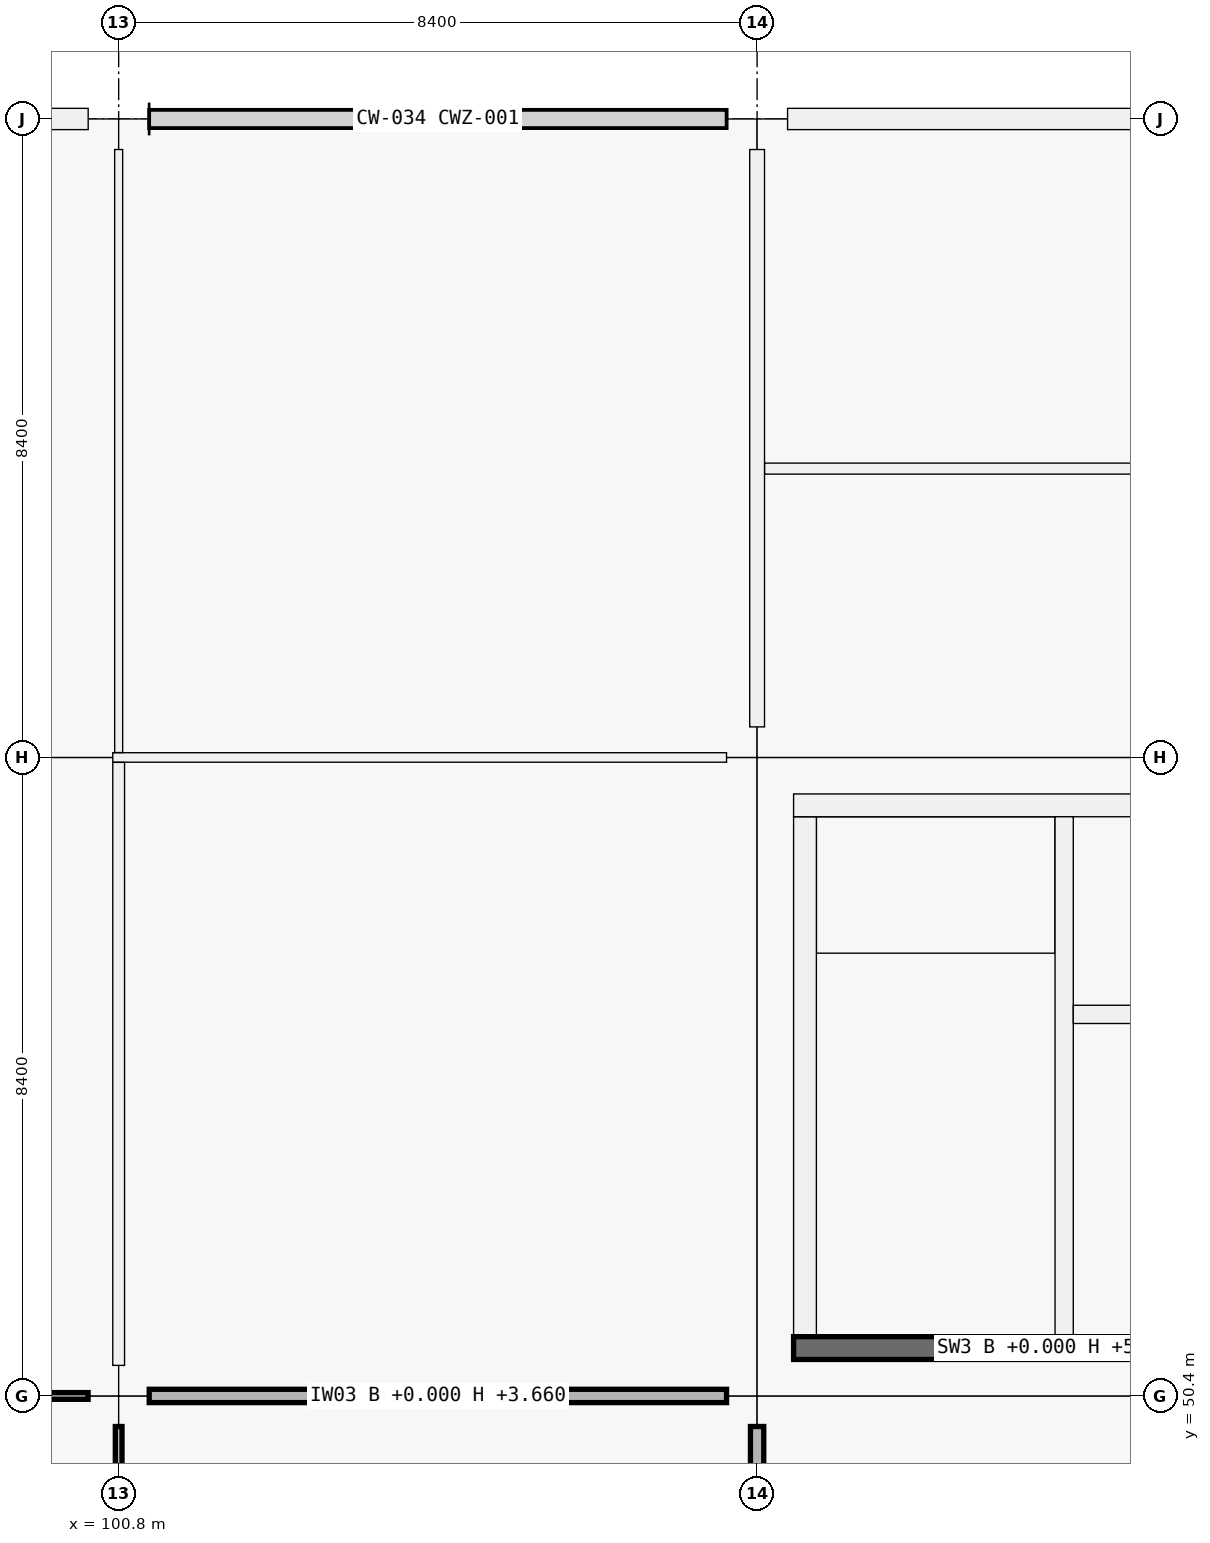
"""IFC4 building model, lengths in metres.
Left out: names, types, materials, properties, quantities, classifications, styles, units other than length and angle.
Written with IfcOpenShell. Run it as: python <this file> out.ifc"""

import sys

from ifc_helpers import new_model, si_unit, direction, frame, frame_2d, origin, origin_2d, place, context, subcontext, project, spatial, rectangle, extrude, element, fill, save


model = new_model("IFC4")
c1 = context("Model", 3, precision=1e-05, world=origin(), true_north=direction((0.0, 1.0)))
c2 = subcontext(c1, "Body", "Model", "MODEL_VIEW")
j1 = project(units=[si_unit("LENGTHUNIT", "METRE"), si_unit("PLANEANGLEUNIT", "RADIAN")], contexts=[c1])
p1 = place(None, origin())
s1 = spatial("IfcSite", under=j1, at=p1, CompositionType="ELEMENT")
p2 = place(p1, origin())
s2 = spatial("IfcBuilding", under=s1, at=p2, CompositionType="ELEMENT")
p3 = place(p2, origin())
s3 = spatial("IfcBuildingStorey", under=s2, at=p3, CompositionType="ELEMENT", Elevation=0.0)
for number, where, z_axis, x_axis in (
    (1, (100.8, 50.4, 0.0), (0.0, 0.0, 1.0), (1.0, 0.0, 0.0)),
    (2, (100.8, 67.2, 0.0), (0.0, 0.0, 1.0), (1.0, 0.0, 0.0)),
    (3, (109.2, 50.4, 0.0), (0.0, 0.0, 1.0), (1.0, 0.0, 0.0)),
    (4, (109.2, 58.8, 0.0), (0.0, 0.0, 1.0), (1.0, 0.0, 0.0)),
    (5, (109.2, 67.2, 0.0), (0.0, 0.0, 1.0), (1.0, 0.0, 0.0)),
):
    element("IfcColumn", number, at=place(p3, frame(where, z_axis=z_axis, x_axis=x_axis)), inside=s3, PredefinedType="COLUMN", context=c2, shape_type="SweptSolid", body=[
        extrude(rectangle(XDim=0.8, YDim=0.8, at=origin_2d()), origin(), (0.0, 0.0, 1.0), 5.76),
    ])
p4 = place(p3, frame((92.801, 67.2, 0.0), z_axis=(0.0, 0.0, 1.0), x_axis=(1.0, 0.0, 0.0)))
e6 = element("IfcWall", 6, at=p4, inside=s3, PredefinedType="SOLIDWALL", context=c2, shape_type="SweptSolid", body=[
    extrude(rectangle(XDim=7.598, YDim=0.28, at=frame_2d((3.799, 0.0))), origin(), (0.0, 0.0, 1.0), 4.7),
])
p5 = place(p4, frame((2.649, 0.0, 0.9)))
e7 = element("IfcOpeningElement", 7, at=p5, cuts=e6, PredefinedType="OPENING", context=c2, shape_type="SweptSolid", body=[
    extrude(rectangle(XDim=2.3, YDim=1.85, at=frame_2d((1.15, 0.925))), frame((0.0, 0.14, 0.0), z_axis=(0.0, -1.0, 0.0), x_axis=(1.0, 0.0, 0.0)), (0.0, 0.0, 1.0), 0.28),
])
p6 = place(p3, frame((109.601, 67.2, 0.0), z_axis=(0.0, 0.0, 1.0), x_axis=(1.0, 0.0, 0.0)))
e8 = element("IfcWall", 8, at=p6, inside=s3, PredefinedType="SOLIDWALL", context=c2, shape_type="SweptSolid", body=[
    extrude(rectangle(XDim=7.623, YDim=0.28, at=frame_2d((3.812, 0.0))), origin(), (0.0, 0.0, 1.0), 4.7),
])
p7 = place(p6, frame((3.087, 0.0, 0.9)))
e9 = element("IfcOpeningElement", 9, at=p7, cuts=e8, PredefinedType="OPENING", context=c2, shape_type="SweptSolid", body=[
    extrude(rectangle(XDim=1.45, YDim=1.85, at=frame_2d((0.725, 0.925))), frame((0.0, 0.14, 0.0), z_axis=(0.0, -1.0, 0.0), x_axis=(1.0, 0.0, 0.0)), (0.0, 0.0, 1.0), 0.28),
])
p8 = place(p3, frame((117.12, 51.03, 0.0), z_axis=(0.0, 0.0, 1.0), x_axis=(-1.0, 0.0, 0.0)))
e10 = element("IfcWall", 10, at=p8, inside=s3, PredefinedType="SHEAR", context=c2, shape_type="SweptSolid", body=[
    extrude(rectangle(XDim=7.44, YDim=0.3, at=frame_2d((3.72, 0.0))), origin(), (0.0, 0.0, 1.0), 5.76),
])
p9 = place(p8, frame((1.28, 0.0, 0.0)))
e11 = element("IfcOpeningElement", 11, at=p9, cuts=e10, PredefinedType="OPENING", context=c2, shape_type="SweptSolid", body=[
    extrude(rectangle(XDim=1.5, YDim=2.15, at=frame_2d((0.75, 1.075))), frame((0.0, 0.15, 0.0), z_axis=(0.0, -1.0, 0.0), x_axis=(1.0, 0.0, 0.0)), (0.0, 0.0, 1.0), 0.3),
])
p10 = place(p3, frame((109.83, 51.18, 0.0), z_axis=(0.0, 0.0, 1.0), x_axis=(0.0, 1.0, 0.0)))
e12 = element("IfcWall", 12, at=p10, inside=s3, PredefinedType="SHEAR", context=c2, shape_type="SweptSolid", body=[
    extrude(rectangle(XDim=6.84, YDim=0.3, at=frame_2d((3.42, 0.0))), origin(), (0.0, 0.0, 1.0), 5.76),
])
p11 = place(p3, frame((109.68, 58.17, 0.0), z_axis=(0.0, 0.0, 1.0), x_axis=(1.0, 0.0, 0.0)))
e13 = element("IfcWall", 13, at=p11, inside=s3, PredefinedType="SHEAR", context=c2, shape_type="SweptSolid", body=[
    extrude(rectangle(XDim=7.44, YDim=0.3, at=frame_2d((3.72, 0.0))), origin(), (0.0, 0.0, 1.0), 5.76),
])
p12 = place(p3, frame((113.24, 51.18, 0.0), z_axis=(0.0, 0.0, 1.0), x_axis=(0.0, 1.0, 0.0)))
e14 = element("IfcWall", 14, at=p12, inside=s3, PredefinedType="SHEAR", context=c2, shape_type="SweptSolid", body=[
    extrude(rectangle(XDim=6.84, YDim=0.24, at=frame_2d((3.42, 0.0))), origin(), (0.0, 0.0, 1.0), 5.76),
])
p13 = place(p12, frame((0.12, 0.0, 0.0)))
e15 = element("IfcOpeningElement", 15, at=p13, cuts=e14, PredefinedType="OPENING", context=c2, shape_type="SweptSolid", body=[
    extrude(rectangle(XDim=1.0, YDim=2.15, at=frame_2d((0.5, 1.075))), frame((0.0, 0.12, 0.0), z_axis=(0.0, -1.0, 0.0), x_axis=(1.0, 0.0, 0.0)), (0.0, 0.0, 1.0), 0.24),
])
p14 = place(p3, frame((113.36, 55.42, 0.0), z_axis=(0.0, 0.0, 1.0), x_axis=(1.0, 0.0, 0.0)))
e16 = element("IfcWall", 16, at=p14, inside=s3, PredefinedType="SHEAR", context=c2, shape_type="SweptSolid", body=[
    extrude(rectangle(XDim=3.46, YDim=0.24, at=frame_2d((1.73, 0.0))), origin(), (0.0, 0.0, 1.0), 5.76),
])
p15 = place(p14, frame((1.18, 0.0, 0.0)))
e17 = element("IfcOpeningElement", 17, at=p15, cuts=e16, PredefinedType="OPENING", context=c2, shape_type="SweptSolid", body=[
    extrude(rectangle(XDim=1.1, YDim=2.15, at=frame_2d((0.55, 1.075))), frame((0.0, 0.12, 0.0), z_axis=(0.0, -1.0, 0.0), x_axis=(1.0, 0.0, 0.0)), (0.0, 0.0, 1.0), 0.24),
])
p16 = place(p3, frame((92.802, 50.4, 0.0), z_axis=(0.0, 0.0, 1.0), x_axis=(1.0, 0.0, 0.0)))
e18 = element("IfcWall", 18, at=p16, inside=s3, PredefinedType="PARTITIONING", context=c2, shape_type="SweptSolid", body=[
    extrude(rectangle(XDim=7.596, YDim=0.088, at=frame_2d((3.798, 0.0))), origin(), (0.0, 0.0, 1.0), 3.66),
])
p17 = place(p16, frame((3.123, 0.0, 0.0)))
e19 = element("IfcOpeningElement", 19, at=p17, cuts=e18, PredefinedType="OPENING", context=c2, shape_type="SweptSolid", body=[
    extrude(rectangle(XDim=1.35, YDim=2.2, at=frame_2d((0.675, 1.1))), frame((0.0, 0.044, 0.0), z_axis=(0.0, -1.0, 0.0), x_axis=(1.0, 0.0, 0.0)), (0.0, 0.0, 1.0), 0.088),
])
p18 = place(p3, frame((101.202, 50.4, 0.0), z_axis=(0.0, 0.0, 1.0), x_axis=(1.0, 0.0, 0.0)))
e20 = element("IfcWall", 20, at=p18, inside=s3, PredefinedType="PARTITIONING", context=c2, shape_type="SweptSolid", body=[
    extrude(rectangle(XDim=7.596, YDim=0.175, at=frame_2d((3.798, 0.0))), origin(), (0.0, 0.0, 1.0), 3.66),
])
p19 = place(p18, frame((2.948, 0.0, 0.0)))
e21 = element("IfcOpeningElement", 21, at=p19, cuts=e20, PredefinedType="OPENING", context=c2, shape_type="SweptSolid", body=[
    extrude(rectangle(XDim=1.7, YDim=2.35, at=frame_2d((0.85, 1.175))), frame((0.0, 0.087, 0.0), z_axis=(0.0, -1.0, 0.0), x_axis=(1.0, 0.0, 0.0)), (0.0, 0.0, 1.0), 0.175),
])
p20 = place(p3, frame((100.722, 58.8, 0.0), z_axis=(0.0, 0.0, 1.0), x_axis=(1.0, 0.0, 0.0)))
e22 = element("IfcWall", 22, at=p20, inside=s3, PredefinedType="PARTITIONING", context=c2, shape_type="SweptSolid", body=[
    extrude(rectangle(XDim=8.076, YDim=0.125, at=frame_2d((4.038, 0.0))), origin(), (0.0, 0.0, 1.0), 3.66),
])
p21 = place(p20, frame((3.238, 0.0, 0.0)))
e23 = element("IfcOpeningElement", 23, at=p21, cuts=e22, PredefinedType="OPENING", context=c2, shape_type="SweptSolid", body=[
    extrude(rectangle(XDim=1.6, YDim=2.3, at=frame_2d((0.8, 1.15))), frame((0.0, 0.062, 0.0), z_axis=(0.0, -1.0, 0.0), x_axis=(1.0, 0.0, 0.0)), (0.0, 0.0, 1.0), 0.125),
])
p22 = place(p3, frame((100.8, 42.402, 0.0), z_axis=(0.0, 0.0, 1.0), x_axis=(0.0, 1.0, 0.0)))
e24 = element("IfcWall", 24, at=p22, inside=s3, PredefinedType="PARTITIONING", context=c2, shape_type="SweptSolid", body=[
    extrude(rectangle(XDim=7.596, YDim=0.088, at=frame_2d((3.798, 0.0))), origin(), (0.0, 0.0, 1.0), 3.66),
])
p23 = place(p22, frame((3.338, 0.0, 0.0)))
e25 = element("IfcOpeningElement", 25, at=p23, cuts=e24, PredefinedType="OPENING", context=c2, shape_type="SweptSolid", body=[
    extrude(rectangle(XDim=0.92, YDim=2.15, at=frame_2d((0.46, 1.075))), frame((0.0, 0.044, 0.0), z_axis=(0.0, -1.0, 0.0), x_axis=(1.0, 0.0, 0.0)), (0.0, 0.0, 1.0), 0.088),
])
p24 = place(p3, frame((100.8, 50.802, 0.0), z_axis=(0.0, 0.0, 1.0), x_axis=(0.0, 1.0, 0.0)))
e26 = element("IfcWall", 26, at=p24, inside=s3, PredefinedType="PARTITIONING", context=c2, shape_type="SweptSolid", body=[
    extrude(rectangle(XDim=7.934, YDim=0.155, at=frame_2d((3.967, 0.0))), origin(), (0.0, 0.0, 1.0), 3.66),
])
p25 = place(p24, frame((3.267, 0.0, 0.0)))
e27 = element("IfcOpeningElement", 27, at=p25, cuts=e26, PredefinedType="OPENING", context=c2, shape_type="SweptSolid", body=[
    extrude(rectangle(XDim=1.4, YDim=2.25, at=frame_2d((0.7, 1.125))), frame((0.0, 0.078, 0.0), z_axis=(0.0, -1.0, 0.0), x_axis=(1.0, 0.0, 0.0)), (0.0, 0.0, 1.0), 0.155),
])
p26 = place(p3, frame((100.8, 58.865, 0.0), z_axis=(0.0, 0.0, 1.0), x_axis=(0.0, 1.0, 0.0)))
e28 = element("IfcWall", 28, at=p26, inside=s3, PredefinedType="PARTITIONING", context=c2, shape_type="SweptSolid", body=[
    extrude(rectangle(XDim=7.934, YDim=0.105, at=frame_2d((3.967, 0.0))), origin(), (0.0, 0.0, 1.0), 3.66),
])
p27 = place(p26, frame((3.292, 0.0, 0.0)))
e29 = element("IfcOpeningElement", 29, at=p27, cuts=e28, PredefinedType="OPENING", context=c2, shape_type="SweptSolid", body=[
    extrude(rectangle(XDim=1.35, YDim=2.2, at=frame_2d((0.675, 1.1))), frame((0.0, 0.052, 0.0), z_axis=(0.0, -1.0, 0.0), x_axis=(1.0, 0.0, 0.0)), (0.0, 0.0, 1.0), 0.105),
])
p28 = place(p3, frame((109.2, 42.402, 0.0), z_axis=(0.0, 0.0, 1.0), x_axis=(0.0, 1.0, 0.0)))
e30 = element("IfcWall", 30, at=p28, inside=s3, PredefinedType="PARTITIONING", context=c2, shape_type="SweptSolid", body=[
    extrude(rectangle(XDim=7.596, YDim=0.175, at=frame_2d((3.798, 0.0))), origin(), (0.0, 0.0, 1.0), 3.66),
])
p29 = place(p28, frame((2.898, 0.0, 0.0)))
e31 = element("IfcOpeningElement", 31, at=p29, cuts=e30, PredefinedType="OPENING", context=c2, shape_type="SweptSolid", body=[
    extrude(rectangle(XDim=1.8, YDim=2.4, at=frame_2d((0.9, 1.2))), frame((0.0, 0.087, 0.0), z_axis=(0.0, -1.0, 0.0), x_axis=(1.0, 0.0, 0.0)), (0.0, 0.0, 1.0), 0.175),
])
p30 = place(p3, frame((109.2, 59.202, 0.0), z_axis=(0.0, 0.0, 1.0), x_axis=(0.0, 1.0, 0.0)))
e32 = element("IfcWall", 32, at=p30, inside=s3, PredefinedType="PARTITIONING", context=c2, shape_type="SweptSolid", body=[
    extrude(rectangle(XDim=7.596, YDim=0.195, at=frame_2d((3.798, 0.0))), origin(), (0.0, 0.0, 1.0), 3.66),
])
p31 = place(p3, frame((109.3, 62.6, 0.0), z_axis=(0.0, 0.0, 1.0), x_axis=(1.0, 0.0, 0.0)))
e33 = element("IfcWall", 33, at=p31, inside=s3, PredefinedType="PARTITIONING", context=c2, shape_type="SweptSolid", body=[
    extrude(rectangle(XDim=8.216, YDim=0.145, at=frame_2d((4.108, 0.0))), origin(), (0.0, 0.0, 1.0), 3.66),
])
p32 = place(p7, origin())
e34 = element("IfcWindow", 34, at=p32, inside=s3, PartitioningType="SINGLE_PANEL", PredefinedType="WINDOW", context=c2, shape_type="SweptSolid", body=[
    extrude(rectangle(XDim=1.45, YDim=1.85, at=frame_2d((0.725, 0.925))), frame((0.0, 0.03, 0.0), z_axis=(0.0, -1.0, 0.0), x_axis=(1.0, 0.0, 0.0)), (0.0, 0.0, 1.0), 0.06),
])
fill(e9, e34)
p33 = place(p13, origin())
e35 = element("IfcDoor", 35, at=p33, inside=s3, OperationType="SINGLE_SWING_LEFT", PredefinedType="DOOR", context=c2, shape_type="SweptSolid", body=[
    extrude(rectangle(XDim=1.0, YDim=2.15, at=frame_2d((0.5, 1.075))), frame((0.0, 0.025, 0.0), z_axis=(0.0, -1.0, 0.0), x_axis=(1.0, 0.0, 0.0)), (0.0, 0.0, 1.0), 0.05),
])
fill(e15, e35)
p34 = place(p19, origin())
e36 = element("IfcDoor", 36, at=p34, inside=s3, OperationType="DOUBLE_DOOR_SINGLE_SWING", PredefinedType="DOOR", context=c2, shape_type="SweptSolid", body=[
    extrude(rectangle(XDim=1.7, YDim=2.35, at=frame_2d((0.85, 1.175))), frame((0.0, 0.025, 0.0), z_axis=(0.0, -1.0, 0.0), x_axis=(1.0, 0.0, 0.0)), (0.0, 0.0, 1.0), 0.05),
])
fill(e21, e36)
p35 = place(p21, origin())
e37 = element("IfcDoor", 37, at=p35, inside=s3, OperationType="DOUBLE_DOOR_SINGLE_SWING", PredefinedType="DOOR", context=c2, shape_type="SweptSolid", body=[
    extrude(rectangle(XDim=1.6, YDim=2.3, at=frame_2d((0.8, 1.15))), frame((0.0, 0.025, 0.0), z_axis=(0.0, -1.0, 0.0), x_axis=(1.0, 0.0, 0.0)), (0.0, 0.0, 1.0), 0.05),
])
fill(e23, e37)
p36 = place(p25, origin())
e38 = element("IfcDoor", 38, at=p36, inside=s3, OperationType="DOUBLE_DOOR_SINGLE_SWING", PredefinedType="DOOR", context=c2, shape_type="SweptSolid", body=[
    extrude(rectangle(XDim=1.4, YDim=2.25, at=frame_2d((0.7, 1.125))), frame((0.0, 0.025, 0.0), z_axis=(0.0, -1.0, 0.0), x_axis=(1.0, 0.0, 0.0)), (0.0, 0.0, 1.0), 0.05),
])
fill(e27, e38)
p37 = place(p27, origin())
e39 = element("IfcDoor", 39, at=p37, inside=s3, OperationType="DOUBLE_DOOR_SINGLE_SWING", PredefinedType="DOOR", context=c2, shape_type="SweptSolid", body=[
    extrude(rectangle(XDim=1.35, YDim=2.2, at=frame_2d((0.675, 1.1))), frame((0.0, 0.025, 0.0), z_axis=(0.0, -1.0, 0.0), x_axis=(1.0, 0.0, 0.0)), (0.0, 0.0, 1.0), 0.05),
])
fill(e29, e39)
save(model, sys.argv[1])
